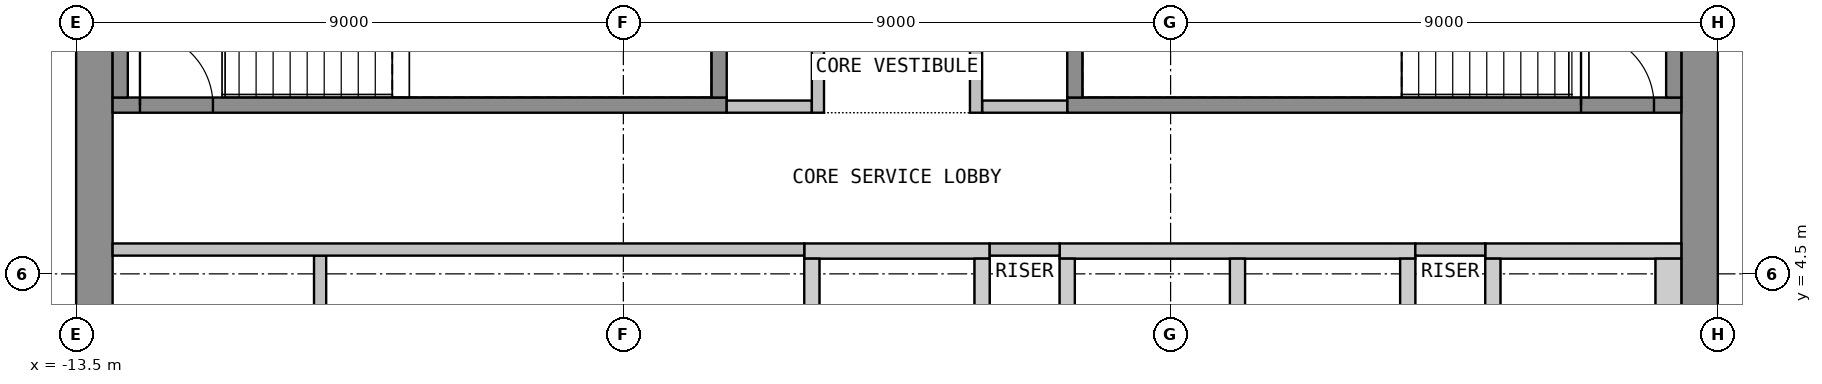
"""IFC4 building model, lengths in metres.
Left out: names, types, materials, properties, quantities, classifications, styles, units other than length and angle.
Written with IfcOpenShell. Run it as: python <this file> out.ifc"""

import sys

from ifc_helpers import new_model, si_unit, direction, frame, frame_2d, origin, place, context, subcontext, project, spatial, polyline, rectangle, outline, extrude, element, fill, save


model = new_model("IFC4")
c1 = context("Model", 3, precision=1e-05, world=origin(), true_north=direction((0.0, 1.0)))
c2 = subcontext(c1, "Body", "Model", "MODEL_VIEW")
j1 = project(units=[si_unit("LENGTHUNIT", "METRE"), si_unit("PLANEANGLEUNIT", "RADIAN")], contexts=[c1])
p1 = place(None, origin())
s1 = spatial("IfcSite", under=j1, at=p1, CompositionType="ELEMENT")
p2 = place(p1, origin())
s2 = spatial("IfcBuilding", under=s1, at=p2, CompositionType="ELEMENT")
p3 = place(p2, frame((0.0, 0.0, 298.2)))
s3 = spatial("IfcBuildingStorey", under=s2, at=p3, CompositionType="ELEMENT", Elevation=298.2)
p4 = place(p3, frame((-13.2, -10.65, 0.0), z_axis=(0.0, 0.0, 1.0), x_axis=(0.0, 1.0, 0.0)))
e1 = element("IfcWall", 1, at=p4, inside=s3, PredefinedType="SHEAR", context=c2, shape_type="SweptSolid", body=[
    extrude(rectangle(XDim=21.3, YDim=0.6, at=frame_2d((10.65, 0.0))), origin(), (0.0, 0.0, 1.0), 3.575),
])
p5 = place(p4, frame((9.45, 0.0, 0.0)))
e2 = element("IfcOpeningElement", 2, at=p5, cuts=e1, PredefinedType="OPENING", context=c2, shape_type="SweptSolid", body=[
    extrude(rectangle(XDim=2.4, YDim=2.1, at=frame_2d((1.2, 1.05))), frame((0.0, 0.31, 0.0), z_axis=(0.0, -1.0, 0.0), x_axis=(1.0, 0.0, 0.0)), (0.0, 0.0, 1.0), 0.62),
])
p6 = place(p3, frame((13.2, -10.65, 0.0), z_axis=(0.0, 0.0, 1.0), x_axis=(0.0, 1.0, 0.0)))
e3 = element("IfcWall", 3, at=p6, inside=s3, PredefinedType="SHEAR", context=c2, shape_type="SweptSolid", body=[
    extrude(rectangle(XDim=21.3, YDim=0.6, at=frame_2d((10.65, 0.0))), origin(), (0.0, 0.0, 1.0), 3.575),
])
p7 = place(p6, frame((9.45, 0.0, 0.0)))
e4 = element("IfcOpeningElement", 4, at=p7, cuts=e3, PredefinedType="OPENING", context=c2, shape_type="SweptSolid", body=[
    extrude(rectangle(XDim=2.4, YDim=2.1, at=frame_2d((1.2, 1.05))), frame((0.0, 0.31, 0.0), z_axis=(0.0, -1.0, 0.0), x_axis=(1.0, 0.0, 0.0)), (0.0, 0.0, 1.0), 0.62),
])
p8 = place(p3, origin())
e5 = element("IfcWall", 5, at=p8, inside=s3, PredefinedType="SHEAR", context=c2, shape_type="SweptSolid", body=[
    extrude(outline(polyline([(-1.525, 4.75), (1.525, 4.75), (1.525, 5.0), (-1.525, 5.0), (-1.525, 4.75)])), origin(), (0.0, 0.0, 1.0), 3.575),
])
p9 = place(p3, origin())
e6 = element("IfcWall", 6, at=p9, inside=s3, PredefinedType="SHEAR", context=c2, shape_type="SweptSolid", body=[
    extrude(outline(polyline([(2.675, 4.75), (8.525, 4.75), (8.525, 5.0), (2.675, 5.0), (2.675, 4.75)])), origin(), (0.0, 0.0, 1.0), 3.575),
])
p10 = place(p3, origin())
e7 = element("IfcWall", 7, at=p10, inside=s3, PredefinedType="SHEAR", context=c2, shape_type="SweptSolid", body=[
    extrude(outline(polyline([(9.675, 4.75), (12.9, 4.75), (12.9, 5.0), (9.675, 5.0), (9.675, 4.75)])), origin(), (0.0, 0.0, 1.0), 3.575),
])
p11 = place(p3, origin())
e8 = element("IfcWall", 8, at=p11, inside=s3, PredefinedType="SHEAR", context=c2, shape_type="SweptSolid", body=[
    extrude(outline(polyline([(-1.525, 2.05), (-1.275, 2.05), (-1.275, 4.75), (-1.525, 4.75), (-1.525, 2.05)])), origin(), (0.0, 0.0, 1.0), 3.575),
])
p12 = place(p3, origin())
e9 = element("IfcWall", 9, at=p12, inside=s3, PredefinedType="SHEAR", context=c2, shape_type="SweptSolid", body=[
    extrude(outline(polyline([(1.275, 2.05), (1.525, 2.05), (1.525, 4.75), (1.275, 4.75), (1.275, 2.05)])), origin(), (0.0, 0.0, 1.0), 3.575),
])
p13 = place(p3, origin())
e10 = element("IfcWall", 10, at=p13, inside=s3, PredefinedType="SHEAR", context=c2, shape_type="SweptSolid", body=[
    extrude(outline(polyline([(2.675, 2.05), (2.925, 2.05), (2.925, 4.75), (2.675, 4.75), (2.675, 2.05)])), origin(), (0.0, 0.0, 1.0), 3.575),
])
p14 = place(p3, origin())
e11 = element("IfcWall", 11, at=p14, inside=s3, PredefinedType="SHEAR", context=c2, shape_type="SweptSolid", body=[
    extrude(outline(polyline([(5.475, 2.05), (5.725, 2.05), (5.725, 4.75), (5.475, 4.75), (5.475, 2.05)])), origin(), (0.0, 0.0, 1.0), 3.575),
])
p15 = place(p3, origin())
e12 = element("IfcWall", 12, at=p15, inside=s3, PredefinedType="SHEAR", context=c2, shape_type="SweptSolid", body=[
    extrude(outline(polyline([(8.275, 2.05), (8.525, 2.05), (8.525, 4.75), (8.275, 4.75), (8.275, 2.05)])), origin(), (0.0, 0.0, 1.0), 3.575),
])
p16 = place(p3, origin())
e13 = element("IfcWall", 13, at=p16, inside=s3, PredefinedType="SHEAR", context=c2, shape_type="SweptSolid", body=[
    extrude(outline(polyline([(9.675, 2.05), (9.925, 2.05), (9.925, 4.75), (9.675, 4.75), (9.675, 2.05)])), origin(), (0.0, 0.0, 1.0), 3.575),
])
p17 = place(p3, origin())
e14 = element("IfcWall", 14, at=p17, inside=s3, PredefinedType="SHEAR", context=c2, shape_type="SweptSolid", body=[
    extrude(outline(polyline([(12.475, 2.05), (12.9, 2.05), (12.9, 4.75), (12.475, 4.75), (12.475, 2.05)])), origin(), (0.0, 0.0, 1.0), 3.575),
])
p18 = place(p3, frame((-12.9, 7.275, 0.0), z_axis=(0.0, 0.0, 1.0), x_axis=(1.0, 0.0, 0.0)))
e15 = element("IfcWall", 15, at=p18, inside=s3, PredefinedType="SHEAR", context=c2, shape_type="SweptSolid", body=[
    extrude(rectangle(XDim=10.1, YDim=0.25, at=frame_2d((5.05, 0.0))), origin(), (0.0, 0.0, 1.0), 3.575),
])
p19 = place(p18, frame((0.45, 0.0, 0.0)))
e16 = element("IfcOpeningElement", 16, at=p19, cuts=e15, PredefinedType="OPENING", context=c2, shape_type="SweptSolid", body=[
    extrude(rectangle(XDim=1.2, YDim=2.1, at=frame_2d((0.6, 1.05))), frame((0.0, 0.135, 0.0), z_axis=(0.0, -1.0, 0.0), x_axis=(1.0, 0.0, 0.0)), (0.0, 0.0, 1.0), 0.27),
])
for number, where, z_axis, x_axis in (
    (17, (-12.775, 7.4, 0.0), (0.0, 0.0, 1.0), (0.0, 1.0, 0.0)),
    (18, (-2.925, 7.4, 0.0), (0.0, 0.0, 1.0), (0.0, 1.0, 0.0)),
):
    element("IfcWall", number, at=place(p3, frame(where, z_axis=z_axis, x_axis=x_axis)), inside=s3, PredefinedType="SHEAR", context=c2, shape_type="SweptSolid", body=[
        extrude(rectangle(XDim=3.25, YDim=0.25, at=frame_2d((1.625, 0.0))), origin(), (0.0, 0.0, 1.0), 3.575),
    ])
p20 = place(p3, frame((2.8, 7.275, 0.0), z_axis=(0.0, 0.0, 1.0), x_axis=(1.0, 0.0, 0.0)))
e19 = element("IfcWall", 19, at=p20, inside=s3, PredefinedType="SHEAR", context=c2, shape_type="SweptSolid", body=[
    extrude(rectangle(XDim=10.1, YDim=0.25, at=frame_2d((5.05, 0.0))), origin(), (0.0, 0.0, 1.0), 3.575),
])
p21 = place(p20, frame((8.45, 0.0, 0.0)))
e20 = element("IfcOpeningElement", 20, at=p21, cuts=e19, PredefinedType="OPENING", context=c2, shape_type="SweptSolid", body=[
    extrude(rectangle(XDim=1.2, YDim=2.1, at=frame_2d((0.6, 1.05))), frame((0.0, 0.135, 0.0), z_axis=(0.0, -1.0, 0.0), x_axis=(1.0, 0.0, 0.0)), (0.0, 0.0, 1.0), 0.27),
])
for number, where, z_axis, x_axis in (
    (21, (2.925, 7.4, 0.0), (0.0, 0.0, 1.0), (0.0, 1.0, 0.0)),
    (22, (12.775, 7.4, 0.0), (0.0, 0.0, 1.0), (0.0, 1.0, 0.0)),
):
    element("IfcWall", number, at=place(p3, frame(where, z_axis=z_axis, x_axis=x_axis)), inside=s3, PredefinedType="SHEAR", context=c2, shape_type="SweptSolid", body=[
        extrude(rectangle(XDim=3.25, YDim=0.25, at=frame_2d((1.625, 0.0))), origin(), (0.0, 0.0, 1.0), 3.575),
    ])
for number, where, z_axis, x_axis in (
    (23, (-2.8, 7.25, 0.0), (0.0, 0.0, 1.0), (1.0, 0.0, 0.0)),
    (24, (1.4, 7.25, 0.0), (0.0, 0.0, 1.0), (1.0, 0.0, 0.0)),
):
    element("IfcWall", number, at=place(p3, frame(where, z_axis=z_axis, x_axis=x_axis)), inside=s3, PredefinedType="PARTITIONING", context=c2, shape_type="SweptSolid", body=[
        extrude(rectangle(XDim=1.4, YDim=0.2, at=frame_2d((0.7, 0.0))), origin(), (0.0, 0.0, 1.0), 3.575),
    ])
p22 = place(p3, frame((-1.3, 7.15, 0.0), z_axis=(0.0, 0.0, 1.0), x_axis=(0.0, 1.0, 0.0)))
e25 = element("IfcWall", 25, at=p22, inside=s3, PredefinedType="PARTITIONING", context=c2, shape_type="SweptSolid", body=[
    extrude(rectangle(XDim=3.5, YDim=0.2, at=frame_2d((1.75, 0.0))), origin(), (0.0, 0.0, 1.0), 3.575),
])
p23 = place(p22, frame((1.4, 0.0, 0.0)))
e26 = element("IfcOpeningElement", 26, at=p23, cuts=e25, PredefinedType="OPENING", context=c2, shape_type="SweptSolid", body=[
    extrude(rectangle(XDim=0.9, YDim=2.1, at=frame_2d((0.45, 1.05))), frame((0.0, 0.11, 0.0), z_axis=(0.0, -1.0, 0.0), x_axis=(1.0, 0.0, 0.0)), (0.0, 0.0, 1.0), 0.22),
])
p24 = place(p3, frame((1.3, 7.15, 0.0), z_axis=(0.0, 0.0, 1.0), x_axis=(0.0, 1.0, 0.0)))
e27 = element("IfcWall", 27, at=p24, inside=s3, PredefinedType="PARTITIONING", context=c2, shape_type="SweptSolid", body=[
    extrude(rectangle(XDim=3.5, YDim=0.2, at=frame_2d((1.75, 0.0))), origin(), (0.0, 0.0, 1.0), 3.575),
])
p25 = place(p24, frame((1.4, 0.0, 0.0)))
e28 = element("IfcOpeningElement", 28, at=p25, cuts=e27, PredefinedType="OPENING", context=c2, shape_type="SweptSolid", body=[
    extrude(rectangle(XDim=0.9, YDim=2.1, at=frame_2d((0.45, 1.05))), frame((0.0, 0.11, 0.0), z_axis=(0.0, -1.0, 0.0), x_axis=(1.0, 0.0, 0.0)), (0.0, 0.0, 1.0), 0.22),
])
p26 = place(p3, frame((-9.488, 2.0, 0.0), z_axis=(0.0, 0.0, 1.0), x_axis=(0.0, 1.0, 0.0)))
e29 = element("IfcWall", 29, at=p26, inside=s3, PredefinedType="PARTITIONING", context=c2, shape_type="SweptSolid", body=[
    extrude(rectangle(XDim=2.8, YDim=0.2, at=frame_2d((1.4, 0.0))), origin(), (0.0, 0.0, 1.0), 3.575),
])
p27 = place(p3, frame((-12.9, 4.9, 0.0), z_axis=(0.0, 0.0, 1.0), x_axis=(1.0, 0.0, 0.0)))
e30 = element("IfcWall", 30, at=p27, inside=s3, PredefinedType="PARTITIONING", context=c2, shape_type="SweptSolid", body=[
    extrude(rectangle(XDim=11.375, YDim=0.2, at=frame_2d((5.688, 0.0))), origin(), (0.0, 0.0, 1.0), 3.575),
])
for number, where, z_axis, x_axis in (
    (31, (1.525, 4.9, 0.0), (0.0, 0.0, 1.0), (1.0, 0.0, 0.0)),
    (32, (8.525, 4.9, 0.0), (0.0, 0.0, 1.0), (1.0, 0.0, 0.0)),
):
    element("IfcWall", number, at=place(p3, frame(where, z_axis=z_axis, x_axis=x_axis)), inside=s3, PredefinedType="PARTITIONING", context=c2, shape_type="SweptSolid", body=[
        extrude(rectangle(XDim=1.15, YDim=0.2, at=frame_2d((0.575, 0.0))), origin(), (0.0, 0.0, 1.0), 3.575),
    ])
p28 = place(p19, origin())
e33 = element("IfcDoor", 33, at=p28, inside=s3, OperationType="SINGLE_SWING_LEFT", PredefinedType="DOOR", context=c2, shape_type="SweptSolid", body=[
    extrude(rectangle(XDim=1.2, YDim=2.1, at=frame_2d((0.6, 1.05))), frame((0.0, 0.025, 0.0), z_axis=(0.0, -1.0, 0.0), x_axis=(1.0, 0.0, 0.0)), (0.0, 0.0, 1.0), 0.05),
])
fill(e16, e33)
p29 = place(p21, origin())
e34 = element("IfcDoor", 34, at=p29, inside=s3, OperationType="SINGLE_SWING_LEFT", PredefinedType="DOOR", context=c2, shape_type="SweptSolid", body=[
    extrude(rectangle(XDim=1.2, YDim=2.1, at=frame_2d((0.6, 1.05))), frame((0.0, 0.025, 0.0), z_axis=(0.0, -1.0, 0.0), x_axis=(1.0, 0.0, 0.0)), (0.0, 0.0, 1.0), 0.05),
])
fill(e20, e34)
save(model, sys.argv[1])
